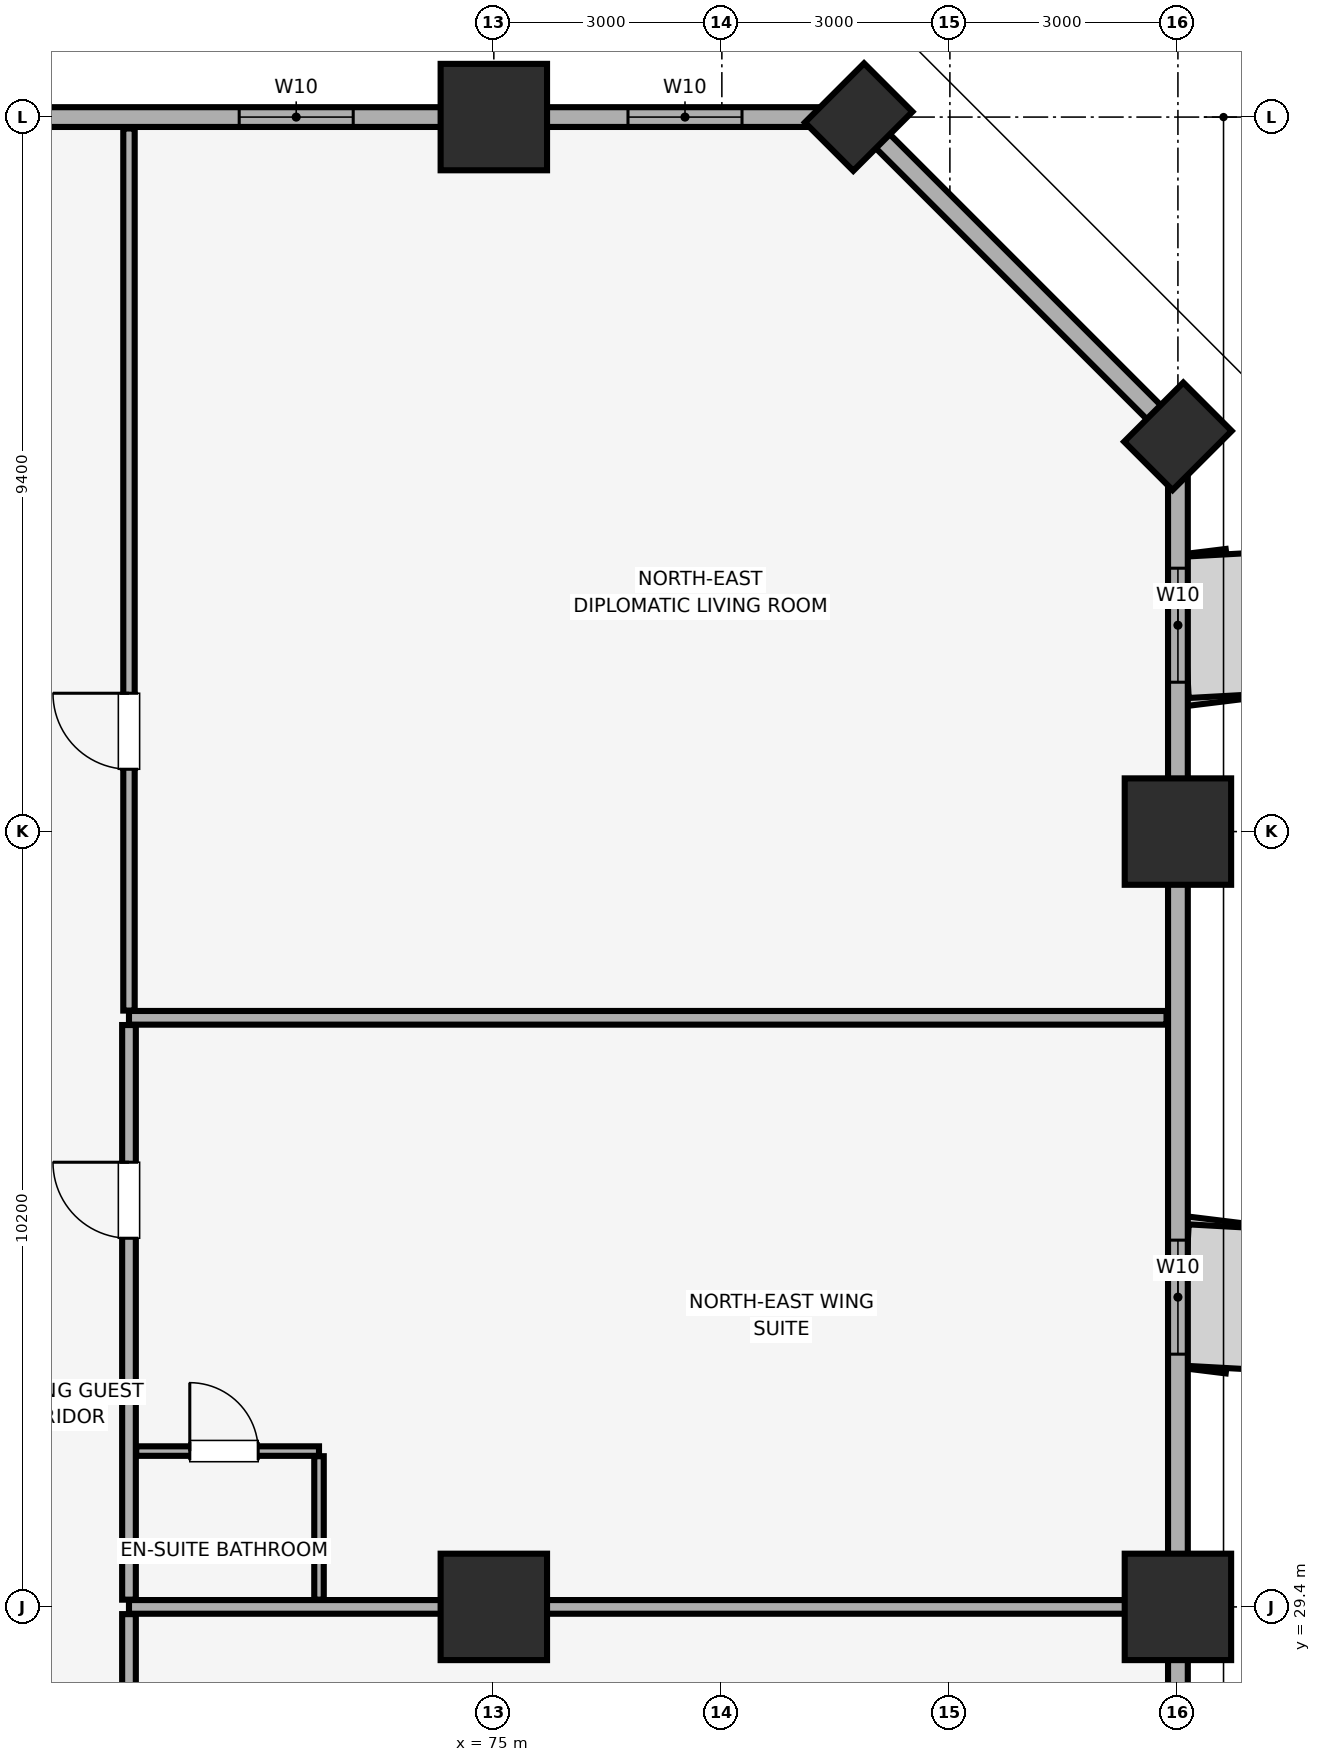
"""IFC4 building model, lengths in metres.
Left out: names, types, materials, properties, quantities, classifications, styles, units other than length and angle.
Written with IfcOpenShell. Run it as: python <this file> out.ifc"""

import sys

from ifc_helpers import new_model, si_unit, direction, frame, frame_2d, origin, origin_2d, place, context, subcontext, project, spatial, rectangle, extrude, element, fill, save


model = new_model("IFC4")
c1 = context("Model", 3, precision=1e-05, world=origin(), true_north=direction((0.0, 1.0)))
c2 = subcontext(c1, "Body", "Model", "MODEL_VIEW")
j1 = project(units=[si_unit("LENGTHUNIT", "METRE"), si_unit("PLANEANGLEUNIT", "RADIAN")], contexts=[c1])
p1 = place(None, origin())
s1 = spatial("IfcSite", under=j1, at=p1, CompositionType="ELEMENT")
p2 = place(p1, origin())
s2 = spatial("IfcBuilding", under=s1, at=p2, CompositionType="ELEMENT")
p3 = place(p2, frame((0.0, 0.0, 68.9)))
s3 = spatial("IfcBuildingStorey", under=s2, at=p3, CompositionType="ELEMENT", Elevation=68.9)
for number, where, z_axis, x_axis in (
    (1, (84.0, 29.4, 0.0), (0.0, 0.0, 1.0), (1.0, 0.0, 0.0)),
    (2, (84.0, 39.6, 0.0), (0.0, 0.0, 1.0), (1.0, 0.0, 0.0)),
):
    element("IfcColumn", number, at=place(p3, frame(where, z_axis=z_axis, x_axis=x_axis)), inside=s3, PredefinedType="COLUMN", context=c2, shape_type="SweptSolid", body=[
        extrude(rectangle(XDim=1.4, YDim=1.4, at=origin_2d()), origin(), (0.0, 0.0, 1.0), 3.51),
    ])
for number, where, z_axis, x_axis in (
    (3, (84.0, 44.8, 0.0), (0.0, 0.0, 1.0), (0.707, 0.707, 0.0)),
    (4, (79.8, 49.0, 0.0), (0.0, 0.0, 1.0), (0.707, 0.707, 0.0)),
):
    element("IfcColumn", number, at=place(p3, frame(where, z_axis=z_axis, x_axis=x_axis)), inside=s3, PredefinedType="PILASTER", context=c2, shape_type="SweptSolid", body=[
        extrude(rectangle(XDim=1.1, YDim=0.9, at=origin_2d()), origin(), (0.0, 0.0, 1.0), 3.51),
    ])
for number, where, z_axis, x_axis in (
    (5, (75.0, 29.4, 0.0), (0.0, 0.0, 1.0), (1.0, 0.0, 0.0)),
    (6, (75.0, 49.0, 0.0), (0.0, 0.0, 1.0), (1.0, 0.0, 0.0)),
):
    element("IfcColumn", number, at=place(p3, frame(where, z_axis=z_axis, x_axis=x_axis)), inside=s3, PredefinedType="COLUMN", context=c2, shape_type="SweptSolid", body=[
        extrude(rectangle(XDim=1.4, YDim=1.4, at=origin_2d()), origin(), (0.0, 0.0, 1.0), 3.51),
    ])
p4 = place(p3, frame((84.0, 4.2, 0.0), z_axis=(0.0, 0.0, 1.0), x_axis=(0.0, 1.0, 0.0)))
e7 = element("IfcWall", 7, at=p4, inside=s3, PredefinedType="SOLIDWALL", context=c2, shape_type="SweptSolid", body=[
    extrude(rectangle(XDim=40.6, YDim=0.26, at=frame_2d((20.3, 0.0))), origin(), (0.0, 0.0, 1.0), 2.56),
])
p5 = place(p4, frame((5.25, 0.0, 0.85)))
e8 = element("IfcOpeningElement", 8, at=p5, cuts=e7, PredefinedType="OPENING", context=c2, shape_type="SweptSolid", body=[
    extrude(rectangle(XDim=1.5, YDim=1.4, at=frame_2d((0.75, 0.7))), frame((0.0, 0.14, 0.0), z_axis=(0.0, -1.0, 0.0), x_axis=(1.0, 0.0, 0.0)), (0.0, 0.0, 1.0), 0.28),
])
p6 = place(p4, frame((13.81, 0.0, 0.85)))
e9 = element("IfcOpeningElement", 9, at=p6, cuts=e7, PredefinedType="OPENING", context=c2, shape_type="SweptSolid", body=[
    extrude(rectangle(XDim=1.5, YDim=1.4, at=frame_2d((0.75, 0.7))), frame((0.0, 0.14, 0.0), z_axis=(0.0, -1.0, 0.0), x_axis=(1.0, 0.0, 0.0)), (0.0, 0.0, 1.0), 0.28),
])
p7 = place(p4, frame((20.61, 0.0, 0.85)))
e10 = element("IfcOpeningElement", 10, at=p7, cuts=e7, PredefinedType="OPENING", context=c2, shape_type="SweptSolid", body=[
    extrude(rectangle(XDim=1.5, YDim=1.4, at=frame_2d((0.75, 0.7))), frame((0.0, 0.14, 0.0), z_axis=(0.0, -1.0, 0.0), x_axis=(1.0, 0.0, 0.0)), (0.0, 0.0, 1.0), 0.28),
])
p8 = place(p4, frame((28.525, 0.0, 0.85)))
e11 = element("IfcOpeningElement", 11, at=p8, cuts=e7, PredefinedType="OPENING", context=c2, shape_type="SweptSolid", body=[
    extrude(rectangle(XDim=1.5, YDim=1.4, at=frame_2d((0.75, 0.7))), frame((0.0, 0.14, 0.0), z_axis=(0.0, -1.0, 0.0), x_axis=(1.0, 0.0, 0.0)), (0.0, 0.0, 1.0), 0.28),
])
p9 = place(p4, frame((37.365, 0.0, 0.85)))
e12 = element("IfcOpeningElement", 12, at=p9, cuts=e7, PredefinedType="OPENING", context=c2, shape_type="SweptSolid", body=[
    extrude(rectangle(XDim=1.5, YDim=1.4, at=frame_2d((0.75, 0.7))), frame((0.0, 0.14, 0.0), z_axis=(0.0, -1.0, 0.0), x_axis=(1.0, 0.0, 0.0)), (0.0, 0.0, 1.0), 0.28),
])
p10 = place(p3, frame((84.0, 44.8, 0.0), z_axis=(0.0, 0.0, 1.0), x_axis=(-0.707106781187, 0.707106781187, 0.0)))
e13 = element("IfcWall", 13, at=p10, inside=s3, PredefinedType="SOLIDWALL", context=c2, shape_type="SweptSolid", body=[
    extrude(rectangle(XDim=5.94, YDim=0.26, at=frame_2d((2.97, 0.0))), origin(), (0.0, 0.0, 1.0), 2.56),
])
p11 = place(p3, frame((79.8, 49.0, 0.0), z_axis=(0.0, 0.0, 1.0), x_axis=(-1.0, 0.0, 0.0)))
e14 = element("IfcWall", 14, at=p11, inside=s3, PredefinedType="SOLIDWALL", context=c2, shape_type="SweptSolid", body=[
    extrude(rectangle(XDim=75.6, YDim=0.26, at=frame_2d((37.8, 0.0))), origin(), (0.0, 0.0, 1.0), 2.56),
])
p12 = place(p11, frame((72.565, 0.0, 0.85)))
e15 = element("IfcOpeningElement", 15, at=p12, cuts=e14, PredefinedType="OPENING", context=c2, shape_type="SweptSolid", body=[
    extrude(rectangle(XDim=1.5, YDim=1.4, at=frame_2d((0.75, 0.7))), frame((0.0, 0.14, 0.0), z_axis=(0.0, -1.0, 0.0), x_axis=(1.0, 0.0, 0.0)), (0.0, 0.0, 1.0), 0.28),
])
p13 = place(p11, frame((67.45, 0.0, 0.85)))
e16 = element("IfcOpeningElement", 16, at=p13, cuts=e14, PredefinedType="OPENING", context=c2, shape_type="SweptSolid", body=[
    extrude(rectangle(XDim=1.5, YDim=1.4, at=frame_2d((0.75, 0.7))), frame((0.0, 0.14, 0.0), z_axis=(0.0, -1.0, 0.0), x_axis=(1.0, 0.0, 0.0)), (0.0, 0.0, 1.0), 0.28),
])
p14 = place(p11, frame((6.65, 0.0, 0.85)))
e17 = element("IfcOpeningElement", 17, at=p14, cuts=e14, PredefinedType="OPENING", context=c2, shape_type="SweptSolid", body=[
    extrude(rectangle(XDim=1.5, YDim=1.4, at=frame_2d((0.75, 0.7))), frame((0.0, 0.14, 0.0), z_axis=(0.0, -1.0, 0.0), x_axis=(1.0, 0.0, 0.0)), (0.0, 0.0, 1.0), 0.28),
])
p15 = place(p11, frame((1.535, 0.0, 0.85)))
e18 = element("IfcOpeningElement", 18, at=p15, cuts=e14, PredefinedType="OPENING", context=c2, shape_type="SweptSolid", body=[
    extrude(rectangle(XDim=1.5, YDim=1.4, at=frame_2d((0.75, 0.7))), frame((0.0, 0.14, 0.0), z_axis=(0.0, -1.0, 0.0), x_axis=(1.0, 0.0, 0.0)), (0.0, 0.0, 1.0), 0.28),
])
p16 = place(p11, frame((51.365, 0.0, 0.9)))
e19 = element("IfcOpeningElement", 19, at=p16, cuts=e14, PredefinedType="OPENING", context=c2, shape_type="SweptSolid", body=[
    extrude(rectangle(XDim=1.5, YDim=1.4, at=frame_2d((0.75, 0.7))), frame((0.0, 0.14, 0.0), z_axis=(0.0, -1.0, 0.0), x_axis=(1.0, 0.0, 0.0)), (0.0, 0.0, 1.0), 0.28),
])
p17 = place(p11, frame((46.0, 0.0, 0.9)))
e20 = element("IfcOpeningElement", 20, at=p17, cuts=e14, PredefinedType="OPENING", context=c2, shape_type="SweptSolid", body=[
    extrude(rectangle(XDim=1.5, YDim=1.4, at=frame_2d((0.75, 0.7))), frame((0.0, 0.14, 0.0), z_axis=(0.0, -1.0, 0.0), x_axis=(1.0, 0.0, 0.0)), (0.0, 0.0, 1.0), 0.28),
])
p18 = place(p11, frame((29.15, 0.0, 0.9)))
e21 = element("IfcOpeningElement", 21, at=p18, cuts=e14, PredefinedType="OPENING", context=c2, shape_type="SweptSolid", body=[
    extrude(rectangle(XDim=1.5, YDim=1.4, at=frame_2d((0.75, 0.7))), frame((0.0, 0.14, 0.0), z_axis=(0.0, -1.0, 0.0), x_axis=(1.0, 0.0, 0.0)), (0.0, 0.0, 1.0), 0.28),
])
p19 = place(p11, frame((23.485, 0.0, 0.9)))
e22 = element("IfcOpeningElement", 22, at=p19, cuts=e14, PredefinedType="OPENING", context=c2, shape_type="SweptSolid", body=[
    extrude(rectangle(XDim=1.5, YDim=1.4, at=frame_2d((0.75, 0.7))), frame((0.0, 0.14, 0.0), z_axis=(0.0, -1.0, 0.0), x_axis=(1.0, 0.0, 0.0)), (0.0, 0.0, 1.0), 0.28),
])
p20 = place(p3, frame((70.2, 29.4, 0.0), z_axis=(0.0, 0.0, 1.0), x_axis=(1.0, 0.0, 0.0)))
e23 = element("IfcWall", 23, at=p20, inside=s3, PredefinedType="PARTITIONING", context=c2, shape_type="SweptSolid", body=[
    extrude(rectangle(XDim=13.65, YDim=0.18, at=frame_2d((6.825, 0.0))), origin(), (0.0, 0.0, 1.0), 2.86),
])
p21 = place(p3, frame((70.2, 22.215, 0.0), z_axis=(0.0, 0.0, 1.0), x_axis=(0.0, 1.0, 0.0)))
e24 = element("IfcWall", 24, at=p21, inside=s3, PredefinedType="PARTITIONING", context=c2, shape_type="SweptSolid", body=[
    extrude(rectangle(XDim=7.09, YDim=0.18, at=frame_2d((3.545, 0.0))), origin(), (0.0, 0.0, 1.0), 3.51),
])
p22 = place(p21, frame((4.13, 0.0, 0.0)))
e25 = element("IfcOpeningElement", 25, at=p22, cuts=e24, PredefinedType="OPENING", context=c2, shape_type="SweptSolid", body=[
    extrude(rectangle(XDim=1.0, YDim=2.15, at=frame_2d((0.5, 1.075))), frame((0.0, 0.1, 0.0), z_axis=(0.0, -1.0, 0.0), x_axis=(1.0, 0.0, 0.0)), (0.0, 0.0, 1.0), 0.2),
])
p23 = place(p3, frame((70.2, 37.15, 0.0), z_axis=(0.0, 0.0, 1.0), x_axis=(1.0, 0.0, 0.0)))
e26 = element("IfcWall", 26, at=p23, inside=s3, PredefinedType="PARTITIONING", context=c2, shape_type="SweptSolid", body=[
    extrude(rectangle(XDim=13.65, YDim=0.18, at=frame_2d((6.825, 0.0))), origin(), (0.0, 0.0, 1.0), 3.51),
])
p24 = place(p3, frame((70.2, 29.495, 0.0), z_axis=(0.0, 0.0, 1.0), x_axis=(0.0, 1.0, 0.0)))
e27 = element("IfcWall", 27, at=p24, inside=s3, PredefinedType="PARTITIONING", context=c2, shape_type="SweptSolid", body=[
    extrude(rectangle(XDim=7.56, YDim=0.18, at=frame_2d((3.78, 0.0))), origin(), (0.0, 0.0, 1.0), 3.51),
])
p25 = place(p24, frame((4.755, 0.0, 0.0)))
e28 = element("IfcOpeningElement", 28, at=p25, cuts=e27, PredefinedType="OPENING", context=c2, shape_type="SweptSolid", body=[
    extrude(rectangle(XDim=1.0, YDim=2.15, at=frame_2d((0.5, 1.075))), frame((0.0, 0.1, 0.0), z_axis=(0.0, -1.0, 0.0), x_axis=(1.0, 0.0, 0.0)), (0.0, 0.0, 1.0), 0.2),
])
p26 = place(p3, frame((70.295, 31.45, 0.0), z_axis=(0.0, 0.0, 1.0), x_axis=(1.0, 0.0, 0.0)))
e29 = element("IfcWall", 29, at=p26, inside=s3, PredefinedType="PARTITIONING", context=c2, shape_type="SweptSolid", body=[
    extrude(rectangle(XDim=2.405, YDim=0.125, at=frame_2d((1.203, 0.0))), origin(), (0.0, 0.0, 1.0), 3.51),
])
p27 = place(p26, frame((0.705, 0.0, 0.0)))
e30 = element("IfcOpeningElement", 30, at=p27, cuts=e29, PredefinedType="OPENING", context=c2, shape_type="SweptSolid", body=[
    extrude(rectangle(XDim=0.9, YDim=2.1, at=frame_2d((0.45, 1.05))), frame((0.0, 0.073, 0.0), z_axis=(0.0, -1.0, 0.0), x_axis=(1.0, 0.0, 0.0)), (0.0, 0.0, 1.0), 0.145),
])
p28 = place(p3, frame((72.7, 29.495, 0.0), z_axis=(0.0, 0.0, 1.0), x_axis=(0.0, 1.0, 0.0)))
e31 = element("IfcWall", 31, at=p28, inside=s3, PredefinedType="PARTITIONING", context=c2, shape_type="SweptSolid", body=[
    extrude(rectangle(XDim=1.887, YDim=0.125, at=frame_2d((0.944, 0.0))), origin(), (0.0, 0.0, 1.0), 3.51),
])
p29 = place(p3, frame((70.2, 37.245, 0.0), z_axis=(0.0, 0.0, 1.0), x_axis=(0.0, 1.0, 0.0)))
e32 = element("IfcWall", 32, at=p29, inside=s3, PredefinedType="PARTITIONING", context=c2, shape_type="SweptSolid", body=[
    extrude(rectangle(XDim=11.605, YDim=0.15, at=frame_2d((5.802, 0.0))), origin(), (0.0, 0.0, 1.0), 3.51),
])
p30 = place(p29, frame((3.175, 0.0, 0.0)))
e33 = element("IfcOpeningElement", 33, at=p30, cuts=e32, PredefinedType="OPENING", context=c2, shape_type="SweptSolid", body=[
    extrude(rectangle(XDim=1.0, YDim=2.15, at=frame_2d((0.5, 1.075))), frame((0.0, 0.085, 0.0), z_axis=(0.0, -1.0, 0.0), x_axis=(1.0, 0.0, 0.0)), (0.0, 0.0, 1.0), 0.17),
])
p31 = place(p8, origin())
e34 = element("IfcWindow", 34, at=p31, inside=s3, PartitioningType="SINGLE_PANEL", PredefinedType="WINDOW", context=c2, shape_type="SweptSolid", body=[
    extrude(rectangle(XDim=1.5, YDim=1.4, at=frame_2d((0.75, 0.7))), frame((0.0, 0.03, 0.0), z_axis=(0.0, -1.0, 0.0), x_axis=(1.0, 0.0, 0.0)), (0.0, 0.0, 1.0), 0.06),
])
fill(e11, e34)
p32 = place(p9, origin())
e35 = element("IfcWindow", 35, at=p32, inside=s3, PartitioningType="SINGLE_PANEL", PredefinedType="WINDOW", context=c2, shape_type="SweptSolid", body=[
    extrude(rectangle(XDim=1.5, YDim=1.4, at=frame_2d((0.75, 0.7))), frame((0.0, 0.03, 0.0), z_axis=(0.0, -1.0, 0.0), x_axis=(1.0, 0.0, 0.0)), (0.0, 0.0, 1.0), 0.06),
])
fill(e12, e35)
p33 = place(p14, origin())
e36 = element("IfcWindow", 36, at=p33, inside=s3, PartitioningType="SINGLE_PANEL", PredefinedType="WINDOW", context=c2, shape_type="SweptSolid", body=[
    extrude(rectangle(XDim=1.5, YDim=1.4, at=frame_2d((0.75, 0.7))), frame((0.0, 0.03, 0.0), z_axis=(0.0, -1.0, 0.0), x_axis=(1.0, 0.0, 0.0)), (0.0, 0.0, 1.0), 0.06),
])
fill(e17, e36)
p34 = place(p15, origin())
e37 = element("IfcWindow", 37, at=p34, inside=s3, PartitioningType="SINGLE_PANEL", PredefinedType="WINDOW", context=c2, shape_type="SweptSolid", body=[
    extrude(rectangle(XDim=1.5, YDim=1.4, at=frame_2d((0.75, 0.7))), frame((0.0, 0.03, 0.0), z_axis=(0.0, -1.0, 0.0), x_axis=(1.0, 0.0, 0.0)), (0.0, 0.0, 1.0), 0.06),
])
fill(e18, e37)
p35 = place(p25, origin())
e38 = element("IfcDoor", 38, at=p35, inside=s3, OperationType="SINGLE_SWING_RIGHT", PredefinedType="DOOR", context=c2, shape_type="SweptSolid", body=[
    extrude(rectangle(XDim=1.0, YDim=2.15, at=frame_2d((0.5, 1.075))), frame((0.0, 0.025, 0.0), z_axis=(0.0, -1.0, 0.0), x_axis=(1.0, 0.0, 0.0)), (0.0, 0.0, 1.0), 0.05),
])
fill(e28, e38)
p36 = place(p27, origin())
e39 = element("IfcDoor", 39, at=p36, inside=s3, OperationType="SINGLE_SWING_LEFT", PredefinedType="DOOR", context=c2, shape_type="SweptSolid", body=[
    extrude(rectangle(XDim=0.9, YDim=2.1, at=frame_2d((0.45, 1.05))), frame((0.0, 0.025, 0.0), z_axis=(0.0, -1.0, 0.0), x_axis=(1.0, 0.0, 0.0)), (0.0, 0.0, 1.0), 0.05),
])
fill(e30, e39)
p37 = place(p30, origin())
e40 = element("IfcDoor", 40, at=p37, inside=s3, OperationType="SINGLE_SWING_RIGHT", PredefinedType="DOOR", context=c2, shape_type="SweptSolid", body=[
    extrude(rectangle(XDim=1.0, YDim=2.15, at=frame_2d((0.5, 1.075))), frame((0.0, 0.025, 0.0), z_axis=(0.0, -1.0, 0.0), x_axis=(1.0, 0.0, 0.0)), (0.0, 0.0, 1.0), 0.05),
])
fill(e33, e40)
save(model, sys.argv[1])
